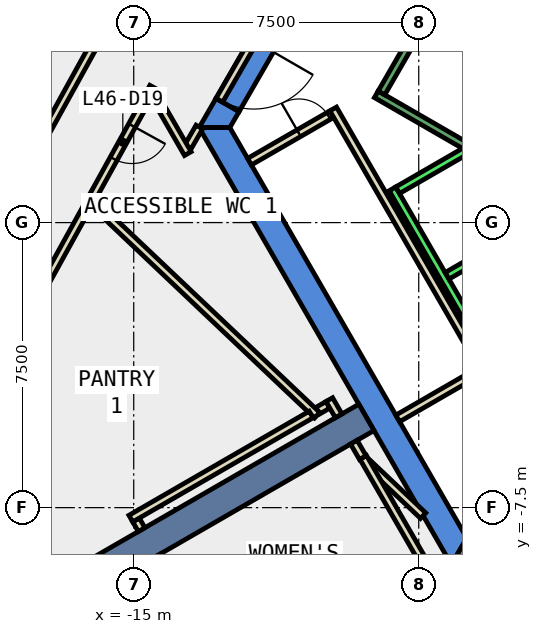
"""IFC4 building model, lengths in metres.
Left out: names, types, materials, properties, quantities, classifications, styles, units other than length and angle.
Written with IfcOpenShell. Run it as: python <this file> out.ifc"""

import sys

from ifc_helpers import new_model, si_unit, direction, frame, frame_2d, origin, place, context, subcontext, project, spatial, polyline, rectangle, outline, extrude, element, fill, save


model = new_model("IFC4")
c1 = context("Model", 3, precision=1e-05, world=origin(), true_north=direction((0.0, 1.0)))
c2 = subcontext(c1, "Body", "Model", "MODEL_VIEW")
j1 = project(units=[si_unit("LENGTHUNIT", "METRE"), si_unit("PLANEANGLEUNIT", "RADIAN")], contexts=[c1])
p1 = place(None, origin())
s1 = spatial("IfcSite", under=j1, at=p1, CompositionType="ELEMENT")
p2 = place(p1, origin())
s2 = spatial("IfcBuilding", under=s1, at=p2, CompositionType="ELEMENT")
p3 = place(p2, frame((0.0, 0.0, 206.6)))
s3 = spatial("IfcBuildingStorey", under=s2, at=p3, CompositionType="ELEMENT", Elevation=206.6)
p4 = place(p3, frame((0.0, 0.0, -0.4)))
e1 = element("IfcWall", 1, at=p4, inside=s3, PredefinedType="SHEAR", context=c2, shape_type="SweptSolid", body=[
    extrude(outline(polyline([(-12.228, 2.92), (-12.834, 3.27), (-13.279, 2.5), (-12.471, 2.5), (-12.228, 2.92)])), origin(), (0.0, 0.0, 1.0), 4.2),
])
p5 = place(p3, frame((0.0, 0.0, 3.6)))
e2 = element("IfcWall", 2, at=p5, inside=s3, PredefinedType="SHEAR", context=c2, shape_type="SweptSolid", body=[
    extrude(outline(polyline([(-12.834, 3.27), (-12.228, 2.92), (-11.228, 4.652), (-11.834, 5.002), (-12.834, 3.27)])), origin(), (0.0, 0.0, 1.0), 0.2),
])
p6 = place(p3, frame((0.0, 0.0, -0.4)))
e3 = element("IfcWall", 3, at=p6, inside=s3, PredefinedType="SHEAR", context=c2, shape_type="SweptSolid", body=[
    extrude(outline(polyline([(-13.279, 2.5), (-6.64, -9.0), (-6.235, -8.3), (-12.471, 2.5), (-13.279, 2.5)])), origin(), (0.0, 0.0, 1.0), 4.2),
])
p7 = place(p3, frame((0.0, 0.0, -0.4)))
e4 = element("IfcWall", 4, at=p7, inside=s3, PredefinedType="SHEAR", context=c2, shape_type="SweptSolid", body=[
    extrude(outline(polyline([(3.75, -9.0), (3.75, -8.3), (-6.235, -8.3), (-6.64, -9.0), (3.75, -9.0)])), origin(), (0.0, 0.0, 1.0), 4.2),
])
p8 = place(p3, frame((-8.877, -5.125, -0.4), z_axis=(0.0, 0.0, 1.0), x_axis=(-0.866017533419, -0.500013631625, 0.0)))
e5 = element("IfcWall", 5, at=p8, inside=s3, PredefinedType="SHEAR", context=c2, shape_type="SweptSolid", body=[
    extrude(rectangle(XDim=9.0, YDim=0.8, at=frame_2d((4.5, 0.0))), origin(), (0.0, 0.0, 1.0), 4.2),
])
p9 = place(p3, frame((-13.273, 2.514, 0.0), z_axis=(0.0, 0.0, 1.0), x_axis=(-0.50111559984, -0.865380353138, 0.0)))
e6 = element("IfcWall", 6, at=p9, inside=s3, PredefinedType="PARTITIONING", context=c2, shape_type="SweptSolid", body=[
    extrude(rectangle(XDim=0.606, YDim=0.2, at=frame_2d((0.303, 0.0))), origin(), (0.0, 0.0, 1.0), 3.8),
])
p10 = place(p3, frame((-13.577, 1.815, 0.0), z_axis=(0.0, 0.0, 1.0), x_axis=(-0.499951005625, 0.866053688852, 0.0)))
e7 = element("IfcWall", 7, at=p10, inside=s3, PredefinedType="PARTITIONING", context=c2, shape_type="SweptSolid", body=[
    extrude(rectangle(XDim=1.819, YDim=0.2, at=frame_2d((0.909, 0.0))), origin(), (0.0, 0.0, 1.0), 3.8),
])
p11 = place(p3, frame((-14.487, 3.564, 0.0), z_axis=(0.0, 0.0, 1.0), x_axis=(-0.483555199903, -0.875313868648, 0.0)))
e8 = element("IfcWall", 8, at=p11, inside=s3, PredefinedType="PARTITIONING", context=c2, shape_type="SweptSolid", body=[
    extrude(rectangle(XDim=3.309, YDim=0.2, at=frame_2d((1.654, 0.0))), origin(), (0.0, 0.0, 1.0), 3.8),
])
p12 = place(p11, frame((1.154, 0.0, 0.0)))
e9 = element("IfcOpeningElement", 9, at=p12, cuts=e8, PredefinedType="OPENING", context=c2, shape_type="SweptSolid", body=[
    extrude(rectangle(XDim=1.0, YDim=2.1, at=frame_2d((0.5, 1.05))), frame((0.0, 0.11, 0.0), z_axis=(0.0, -1.0, 0.0), x_axis=(1.0, 0.0, 0.0)), (0.0, 0.0, 1.0), 0.22),
])
p13 = place(p3, frame((-16.184, 0.493, 0.0), z_axis=(0.0, 0.0, 1.0), x_axis=(-0.48354397003, -0.875320072344, 0.0)))
e10 = element("IfcWall", 10, at=p13, inside=s3, PredefinedType="PARTITIONING", context=c2, shape_type="SweptSolid", body=[
    extrude(rectangle(XDim=4.467, YDim=0.2, at=frame_2d((2.233, 0.0))), origin(), (0.0, 0.0, 1.0), 3.8),
])
p14 = place(p3, frame((-18.015, 1.107, 0.0), z_axis=(0.0, 0.0, 1.0), x_axis=(0.483551557311, 0.875315880938, 0.0)))
e11 = element("IfcWall", 11, at=p14, inside=s3, PredefinedType="PARTITIONING", context=c2, shape_type="SweptSolid", body=[
    extrude(rectangle(XDim=3.987, YDim=0.2, at=frame_2d((1.994, 0.0))), origin(), (0.0, 0.0, 1.0), 3.8),
])
p15 = place(p3, frame((-5.888, -3.902, 0.0), z_axis=(0.0, 0.0, 1.0), x_axis=(-0.866022959057, -0.500004234368, 0.0)))
e12 = element("IfcWall", 12, at=p15, inside=s3, PredefinedType="PARTITIONING", context=c2, shape_type="SweptSolid", body=[
    extrude(rectangle(XDim=2.5, YDim=0.2, at=frame_2d((1.25, 0.0))), origin(), (0.0, 0.0, 1.0), 3.8),
])
p16 = place(p3, frame((-11.953, 1.603, 0.0), z_axis=(0.0, 0.0, 1.0), x_axis=(0.865998541277, 0.500046524342, 0.0)))
e13 = element("IfcWall", 13, at=p16, inside=s3, PredefinedType="PARTITIONING", context=c2, shape_type="SweptSolid", body=[
    extrude(rectangle(XDim=2.5, YDim=0.2, at=frame_2d((1.25, 0.0))), origin(), (0.0, 0.0, 1.0), 3.8),
])
p17 = place(p16, frame((1.5, 0.0, 0.0)))
e14 = element("IfcOpeningElement", 14, at=p17, cuts=e13, PredefinedType="OPENING", context=c2, shape_type="SweptSolid", body=[
    extrude(rectangle(XDim=0.9, YDim=2.1, at=frame_2d((0.45, 1.05))), frame((0.0, 0.11, 0.0), z_axis=(0.0, -1.0, 0.0), x_axis=(1.0, 0.0, 0.0)), (0.0, 0.0, 1.0), 0.22),
])
p18 = place(p3, frame((-9.751, 2.99, 0.0), z_axis=(0.0, 0.0, 1.0), x_axis=(0.500012163284, -0.866018381195, 0.0)))
e15 = element("IfcWall", 15, at=p18, inside=s3, PredefinedType="PARTITIONING", context=c2, shape_type="SweptSolid", body=[
    extrude(rectangle(XDim=8.0, YDim=0.2, at=frame_2d((4.0, 0.0))), origin(), (0.0, 0.0, 1.0), 3.8),
])
p19 = place(p3, frame((-8.84, -6.332, 0.0), z_axis=(0.0, 0.0, 1.0), x_axis=(0.726080635734, -0.687609562479, 0.0)))
e16 = element("IfcWall", 16, at=p19, inside=s3, PredefinedType="PARTITIONING", context=c2, shape_type="SweptSolid", body=[
    extrude(rectangle(XDim=2.005, YDim=0.2, at=frame_2d((1.003, 0.0))), origin(), (0.0, 0.0, 1.0), 3.8),
])
p20 = place(p3, frame((-7.283, -9.086, 0.0), z_axis=(0.0, 0.0, 1.0), x_axis=(-0.499883958536, 0.86609238999, 0.0)))
e17 = element("IfcWall", 17, at=p20, inside=s3, PredefinedType="PARTITIONING", context=c2, shape_type="SweptSolid", body=[
    extrude(rectangle(XDim=3.359, YDim=0.2, at=frame_2d((1.679, 0.0))), origin(), (0.0, 0.0, 1.0), 3.8),
])
p21 = place(p3, frame((-8.973, -6.183, 0.0), z_axis=(0.0, 0.0, 1.0), x_axis=(-0.499557093027, 0.86628096528, 0.0)))
e18 = element("IfcWall", 18, at=p21, inside=s3, PredefinedType="PARTITIONING", context=c2, shape_type="SweptSolid", body=[
    extrude(rectangle(XDim=0.469, YDim=0.2, at=frame_2d((0.234, 0.0))), origin(), (0.0, 0.0, 1.0), 3.8),
])
p22 = place(p3, frame((-9.89, -4.795, 0.0), z_axis=(0.0, 0.0, 1.0), x_axis=(-0.866447259568, -0.499268611457, 0.0)))
e19 = element("IfcWall", 19, at=p22, inside=s3, PredefinedType="PARTITIONING", context=c2, shape_type="SweptSolid", body=[
    extrude(rectangle(XDim=0.311, YDim=0.2, at=frame_2d((0.155, 0.0))), origin(), (0.0, 0.0, 1.0), 3.8),
])
p23 = place(p3, frame((-10.173, -5.069, 0.0), z_axis=(0.0, 0.0, 1.0), x_axis=(-0.725908697087, 0.687791075468, 0.0)))
e20 = element("IfcWall", 20, at=p23, inside=s3, PredefinedType="PARTITIONING", context=c2, shape_type="SweptSolid", body=[
    extrude(rectangle(XDim=8.313, YDim=0.2, at=frame_2d((4.157, 0.0))), origin(), (0.0, 0.0, 1.0), 3.8),
])
p24 = place(p3, frame((-14.792, -8.078, 0.0), z_axis=(0.0, 0.0, 1.0), x_axis=(-0.50241736454, 0.864625231999, 0.0)))
e21 = element("IfcWall", 21, at=p24, inside=s3, PredefinedType="PARTITIONING", context=c2, shape_type="SweptSolid", body=[
    extrude(rectangle(XDim=0.292, YDim=0.2, at=frame_2d((0.146, 0.0))), origin(), (0.0, 0.0, 1.0), 3.8),
])
p25 = place(p3, frame((-15.076, -7.788, 0.0), z_axis=(0.0, 0.0, 1.0), x_axis=(0.866092814325, 0.499883223337, 0.0)))
e22 = element("IfcWall", 22, at=p25, inside=s3, PredefinedType="PARTITIONING", context=c2, shape_type="SweptSolid", body=[
    extrude(rectangle(XDim=5.477, YDim=0.2, at=frame_2d((2.739, 0.0))), origin(), (0.0, 0.0, 1.0), 3.8),
])
p26 = place(p3, frame((-11.059, -14.545, 0.0), z_axis=(0.0, 0.0, 1.0), x_axis=(-0.499935899035, 0.866062409331, 0.0)))
e23 = element("IfcWall", 23, at=p26, inside=s3, PredefinedType="PARTITIONING", context=c2, shape_type="SweptSolid", body=[
    extrude(rectangle(XDim=6.667, YDim=0.2, at=frame_2d((3.333, 0.0))), origin(), (0.0, 0.0, 1.0), 3.8),
])
p27 = place(p3, frame((-11.747, 4.952, 0.0), z_axis=(0.0, 0.0, 1.0), x_axis=(-0.50002537861, -0.866010750942, 0.0)))
e24 = element("IfcWall", 24, at=p27, inside=s3, PredefinedType="PARTITIONING", context=c2, shape_type="SweptSolid", body=[
    extrude(rectangle(XDim=2.0, YDim=0.2, at=frame_2d((1.0, 0.0))), origin(), (0.0, 0.0, 1.0), 2.4),
])
p28 = place(p27, frame((0.19, 0.0, 0.0)))
e25 = element("IfcOpeningElement", 25, at=p28, cuts=e24, PredefinedType="OPENING", context=c2, shape_type="SweptSolid", body=[
    extrude(rectangle(XDim=1.8, YDim=2.1, at=frame_2d((0.9, 1.05))), frame((0.0, 0.11, 0.0), z_axis=(0.0, -1.0, 0.0), x_axis=(1.0, 0.0, 0.0)), (0.0, 0.0, 1.0), 0.22),
])
p29 = place(p3, frame((-9.607, -5.084, 0.0), z_axis=(0.0, 0.0, 1.0), x_axis=(-0.500194922027, 0.865912836248, 0.0)))
e26 = element("IfcWall", 26, at=p29, inside=s3, PredefinedType="PARTITIONING", context=c2, shape_type="SweptSolid", body=[
    extrude(rectangle(XDim=0.492, YDim=0.2, at=frame_2d((0.246, 0.0))), origin(), (0.0, 0.0, 1.0), 3.8),
])
p30 = place(p3, frame((-8.192, 0.888, 0.0), z_axis=(0.0, 0.0, 1.0), x_axis=(0.500034260056, -0.866005622828, 0.0)))
e27 = element("IfcWall", 27, at=p30, inside=s3, PredefinedType="STANDARD", context=c2, shape_type="SweptSolid", body=[
    extrude(rectangle(XDim=5.399, YDim=0.2, at=frame_2d((2.7, 0.0))), origin(), (0.0, 0.0, 1.0), 3.8),
])
for number, where, z_axis, x_axis in (
    (28, (-5.977, 2.052, 0.0), (0.0, 0.0, 1.0), (-0.866, -0.5, 0.0)),
    (29, (-4.677, -0.2, 0.0), (0.0, 0.0, 1.0), (-0.866, -0.5, 0.0)),
):
    element("IfcWall", number, at=place(p3, frame(where, z_axis=z_axis, x_axis=x_axis)), inside=s3, PredefinedType="STANDARD", context=c2, shape_type="SweptSolid", body=[
        extrude(rectangle(XDim=2.399, YDim=0.2, at=frame_2d((1.2, 0.0))), origin(), (0.0, 0.0, 1.0), 3.8),
    ])
p31 = place(p3, frame((-6.25, 2.01, 0.0), z_axis=(0.0, 0.0, 1.0), x_axis=(-0.86611865017, 0.499838457731, 0.0)))
e30 = element("IfcWall", 30, at=p31, inside=s3, PredefinedType="STANDARD", context=c2, shape_type="SweptSolid", body=[
    extrude(rectangle(XDim=2.733, YDim=0.2, at=frame_2d((1.366, 0.0))), origin(), (0.0, 0.0, 1.0), 3.8),
])
p32 = place(p3, frame((-5.03, 9.388, 0.0), z_axis=(0.0, 0.0, 1.0), x_axis=(-0.499978703459, -0.866037698999, 0.0)))
e31 = element("IfcWall", 31, at=p32, inside=s3, PredefinedType="STANDARD", context=c2, shape_type="SweptSolid", body=[
    extrude(rectangle(XDim=6.9, YDim=0.2, at=frame_2d((3.45, 0.0))), origin(), (0.0, 0.0, 1.0), 3.8),
])
p33 = place(p12, origin())
e32 = element("IfcDoor", 32, at=p33, inside=s3, OperationType="SINGLE_SWING_LEFT", PredefinedType="DOOR", context=c2, shape_type="SweptSolid", body=[
    extrude(rectangle(XDim=1.0, YDim=2.1, at=frame_2d((0.5, 1.05))), frame((0.0, 0.025, 0.0), z_axis=(0.0, -1.0, 0.0), x_axis=(1.0, 0.0, 0.0)), (0.0, 0.0, 1.0), 0.05),
])
fill(e9, e32)
p34 = place(p17, origin())
e33 = element("IfcDoor", 33, at=p34, inside=s3, OperationType="SINGLE_SWING_LEFT", PredefinedType="DOOR", context=c2, shape_type="SweptSolid", body=[
    extrude(rectangle(XDim=0.9, YDim=2.1, at=frame_2d((0.45, 1.05))), frame((0.0, 0.025, 0.0), z_axis=(0.0, -1.0, 0.0), x_axis=(1.0, 0.0, 0.0)), (0.0, 0.0, 1.0), 0.05),
])
fill(e14, e33)
p35 = place(p28, origin())
e34 = element("IfcDoor", 34, at=p35, inside=s3, OperationType="DOUBLE_DOOR_SINGLE_SWING", PredefinedType="DOOR", context=c2, shape_type="SweptSolid", body=[
    extrude(rectangle(XDim=1.8, YDim=2.1, at=frame_2d((0.9, 1.05))), frame((0.0, 0.025, 0.0), z_axis=(0.0, -1.0, 0.0), x_axis=(1.0, 0.0, 0.0)), (0.0, 0.0, 1.0), 0.05),
])
fill(e25, e34)
save(model, sys.argv[1])
